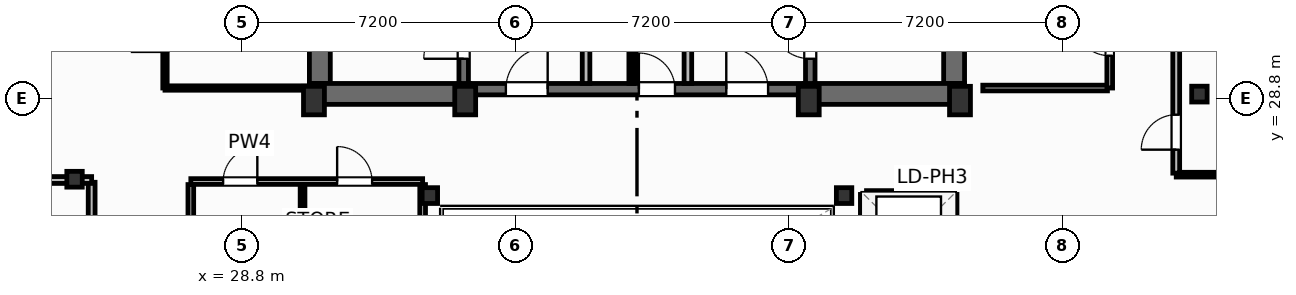
"""IFC4 building model, lengths in metres.
Left out: names, types, materials, properties, quantities, classifications, styles, units other than length and angle.
Written with IfcOpenShell. Run it as: python <this file> out.ifc"""

import sys

from ifc_helpers import new_model, si_unit, direction, frame, frame_2d, origin, origin_2d, place, context, subcontext, project, spatial, rectangle, i_section, extrude, element, fill, save


model = new_model("IFC4")
c1 = context("Model", 3, precision=1e-05, world=origin(), true_north=direction((0.0, 1.0)))
c2 = subcontext(c1, "Body", "Model", "MODEL_VIEW")
j1 = project(units=[si_unit("LENGTHUNIT", "METRE"), si_unit("PLANEANGLEUNIT", "RADIAN")], contexts=[c1])
p1 = place(None, origin())
s1 = spatial("IfcSite", under=j1, at=p1, CompositionType="ELEMENT")
p2 = place(p1, origin())
s2 = spatial("IfcBuilding", under=s1, at=p2, CompositionType="ELEMENT")
p3 = place(p2, frame((0.0, 0.0, 269.3)))
s3 = spatial("IfcBuildingStorey", under=s2, at=p3, CompositionType="ELEMENT", Elevation=269.3)
for number, where, z_axis, x_axis in (
    (1, (30.7, 28.75, 0.0), (0.0, 0.0, 1.0), (1.0, 0.0, 0.0)),
    (2, (34.68, 28.75, 0.0), (0.0, 0.0, 1.0), (1.0, 0.0, 0.0)),
    (3, (43.72, 28.75, 0.0), (0.0, 0.0, 1.0), (1.0, 0.0, 0.0)),
    (4, (47.7, 28.75, 0.0), (0.0, 0.0, 1.0), (1.0, 0.0, 0.0)),
):
    element("IfcColumn", number, at=place(p3, frame(where, z_axis=z_axis, x_axis=x_axis)), inside=s3, PredefinedType="COLUMN", context=c2, shape_type="SweptSolid", body=[
        extrude(rectangle(XDim=0.55, YDim=0.75, at=origin_2d()), origin(), (0.0, 0.0, 1.0), 3.7),
    ])
for number, where, z_axis, x_axis in (
    (5, (33.75, 26.25, 0.0), (0.0, 0.0, 1.0), (1.0, 0.0, 0.0)),
    (6, (44.65, 26.25, 0.0), (0.0, 0.0, 1.0), (1.0, 0.0, 0.0)),
    (7, (24.4, 26.68, 0.0), (0.0, 0.0, 1.0), (1.0, 0.0, 0.0)),
    (8, (54.0, 28.92, 0.0), (0.0, 0.0, 1.0), (1.0, 0.0, 0.0)),
):
    element("IfcColumn", number, at=place(p3, frame(where, z_axis=z_axis, x_axis=x_axis)), inside=s3, PredefinedType="COLUMN", context=c2, shape_type="SweptSolid", body=[
        extrude(i_section(OverallWidth=0.406, OverallDepth=0.416, WebThickness=0.03, FlangeThickness=0.048, FilletRadius=0.025, at=origin_2d()), origin(), (0.0, 0.0, 1.0), 3.7),
    ])
for number, where, z_axis, x_axis in (
    (9, (30.855, 29.2, 0.0), (0.0, 0.0, 1.0), (0.0, 1.0, 0.0)),
    (10, (47.545, 29.2, 0.0), (0.0, 0.0, 1.0), (0.0, 1.0, 0.0)),
):
    element("IfcWall", number, at=place(p3, frame(where, z_axis=z_axis, x_axis=x_axis)), inside=s3, PredefinedType="SHEAR", context=c2, shape_type="SweptSolid", body=[
        extrude(rectangle(XDim=9.22, YDim=0.55, at=frame_2d((4.61, 0.0))), origin(), (0.0, 0.0, 1.0), 3.45),
    ])
for number, where, z_axis, x_axis in (
    (11, (30.58, 28.925, 0.0), (0.0, 0.0, 1.0), (1.0, 0.0, 0.0)),
    (12, (43.6, 28.925, 0.0), (0.0, 0.0, 1.0), (1.0, 0.0, 0.0)),
):
    element("IfcWall", number, at=place(p3, frame(where, z_axis=z_axis, x_axis=x_axis)), inside=s3, PredefinedType="SHEAR", context=c2, shape_type="SweptSolid", body=[
        extrude(rectangle(XDim=4.22, YDim=0.55, at=frame_2d((2.11, 0.0))), origin(), (0.0, 0.0, 1.0), 3.45),
    ])
p4 = place(p3, frame((34.8, 29.05, 0.0), z_axis=(0.0, 0.0, 1.0), x_axis=(1.0, 0.0, 0.0)))
e13 = element("IfcWall", 13, at=p4, inside=s3, PredefinedType="SHEAR", context=c2, shape_type="SweptSolid", body=[
    extrude(rectangle(XDim=8.8, YDim=0.3, at=frame_2d((4.4, 0.0))), origin(), (0.0, 0.0, 1.0), 3.45),
])
p5 = place(p4, frame((0.95, 0.0, 0.0)))
e14 = element("IfcOpeningElement", 14, at=p5, cuts=e13, PredefinedType="OPENING", context=c2, shape_type="SweptSolid", body=[
    extrude(rectangle(XDim=1.1, YDim=2.15, at=frame_2d((0.55, 1.075))), frame((0.0, 0.16, 0.0), z_axis=(0.0, -1.0, 0.0), x_axis=(1.0, 0.0, 0.0)), (0.0, 0.0, 1.0), 0.32),
])
p6 = place(p4, frame((6.75, 0.0, 0.0)))
e15 = element("IfcOpeningElement", 15, at=p6, cuts=e13, PredefinedType="OPENING", context=c2, shape_type="SweptSolid", body=[
    extrude(rectangle(XDim=1.1, YDim=2.15, at=frame_2d((0.55, 1.075))), frame((0.0, 0.16, 0.0), z_axis=(0.0, -1.0, 0.0), x_axis=(1.0, 0.0, 0.0)), (0.0, 0.0, 1.0), 0.32),
])
p7 = place(p4, frame((4.45, 0.0, 0.0)))
e16 = element("IfcOpeningElement", 16, at=p7, cuts=e13, PredefinedType="OPENING", context=c2, shape_type="SweptSolid", body=[
    extrude(rectangle(XDim=0.95, YDim=2.15, at=frame_2d((0.475, 1.075))), frame((0.0, 0.16, 0.0), z_axis=(0.0, -1.0, 0.0), x_axis=(1.0, 0.0, 0.0)), (0.0, 0.0, 1.0), 0.32),
])
p8 = place(p3, frame((34.64, 29.2, 0.0), z_axis=(0.0, 0.0, 1.0), x_axis=(0.0, 1.0, 0.0)))
e17 = element("IfcWall", 17, at=p8, inside=s3, PredefinedType="SHEAR", context=c2, shape_type="SweptSolid", body=[
    extrude(rectangle(XDim=9.22, YDim=0.25, at=frame_2d((4.61, 0.0))), origin(), (0.0, 0.0, 1.0), 3.45),
])
p9 = place(p8, frame((0.65, 0.0, 0.0)))
e18 = element("IfcOpeningElement", 18, at=p9, cuts=e17, PredefinedType="OPENING", context=c2, shape_type="SweptSolid", body=[
    extrude(rectangle(XDim=1.05, YDim=2.15, at=frame_2d((0.525, 1.075))), frame((0.0, 0.135, 0.0), z_axis=(0.0, -1.0, 0.0), x_axis=(1.0, 0.0, 0.0)), (0.0, 0.0, 1.0), 0.27),
])
p10 = place(p3, frame((43.76, 29.2, 0.0), z_axis=(0.0, 0.0, 1.0), x_axis=(0.0, 1.0, 0.0)))
e19 = element("IfcWall", 19, at=p10, inside=s3, PredefinedType="SHEAR", context=c2, shape_type="SweptSolid", body=[
    extrude(rectangle(XDim=9.22, YDim=0.25, at=frame_2d((4.61, 0.0))), origin(), (0.0, 0.0, 1.0), 3.45),
])
p11 = place(p10, frame((0.65, 0.0, 0.0)))
e20 = element("IfcOpeningElement", 20, at=p11, cuts=e19, PredefinedType="OPENING", context=c2, shape_type="SweptSolid", body=[
    extrude(rectangle(XDim=1.05, YDim=2.15, at=frame_2d((0.525, 1.075))), frame((0.0, 0.135, 0.0), z_axis=(0.0, -1.0, 0.0), x_axis=(1.0, 0.0, 0.0)), (0.0, 0.0, 1.0), 0.27),
])
p12 = place(p3, frame((24.85, 23.03, 0.0), z_axis=(0.0, 0.0, 1.0), x_axis=(0.0, 1.0, 0.0)))
e21 = element("IfcWall", 21, at=p12, inside=s3, PredefinedType="PARTITIONING", context=c2, shape_type="SweptSolid", body=[
    extrude(rectangle(XDim=3.57, YDim=0.18, at=frame_2d((1.785, 0.0))), origin(), (0.0, 0.0, 1.0), 3.45),
])
p13 = place(p12, frame((1.5, 0.0, 0.0)))
e22 = element("IfcOpeningElement", 22, at=p13, cuts=e21, PredefinedType="OPENING", context=c2, shape_type="SweptSolid", body=[
    extrude(rectangle(XDim=0.92, YDim=2.05, at=frame_2d((0.46, 1.025))), frame((0.0, 0.1, 0.0), z_axis=(0.0, -1.0, 0.0), x_axis=(1.0, 0.0, 0.0)), (0.0, 0.0, 1.0), 0.2),
])
p14 = place(p3, frame((5.107, 26.66, 0.0), z_axis=(0.0, 0.0, 1.0), x_axis=(1.0, 0.0, 0.0)))
e23 = element("IfcWall", 23, at=p14, inside=s3, PredefinedType="PARTITIONING", context=c2, shape_type="SweptSolid", body=[
    extrude(rectangle(XDim=19.743, YDim=0.18, at=frame_2d((9.872, 0.0))), origin(), (0.0, 0.0, 1.0), 2.662),
])
p15 = place(p3, frame((53.39, 26.8, 0.0), z_axis=(0.0, 0.0, 1.0), x_axis=(1.0, 0.0, 0.0)))
e24 = element("IfcWall", 24, at=p15, inside=s3, PredefinedType="PARTITIONING", context=c2, shape_type="SweptSolid", body=[
    extrude(rectangle(XDim=22.348, YDim=0.125, at=frame_2d((11.174, 0.0))), origin(), (0.0, 0.0, 1.0), 3.45),
])
p16 = place(p3, frame((53.39, 26.84, 0.0), z_axis=(0.0, 0.0, 1.0), x_axis=(0.0, 1.0, 0.0)))
e25 = element("IfcWall", 25, at=p16, inside=s3, PredefinedType="PARTITIONING", context=c2, shape_type="SweptSolid", body=[
    extrude(rectangle(XDim=12.46, YDim=0.18, at=frame_2d((6.23, 0.0))), origin(), (0.0, 0.0, 1.0), 3.45),
])
p17 = place(p16, frame((0.618, 0.0, 0.0)))
e26 = element("IfcOpeningElement", 26, at=p17, cuts=e25, PredefinedType="OPENING", context=c2, shape_type="SweptSolid", body=[
    extrude(rectangle(XDim=0.92, YDim=2.05, at=frame_2d((0.46, 1.025))), frame((0.0, 0.1, 0.0), z_axis=(0.0, -1.0, 0.0), x_axis=(1.0, 0.0, 0.0)), (0.0, 0.0, 1.0), 0.2),
])
for number, where, z_axis, x_axis in (
    (27, (37.86, 29.2, 0.0), (0.0, 0.0, 1.0), (0.0, 1.0, 0.0)),
    (28, (40.54, 29.2, 0.0), (0.0, 0.0, 1.0), (0.0, 1.0, 0.0)),
):
    element("IfcWall", number, at=place(p3, frame(where, z_axis=z_axis, x_axis=x_axis)), inside=s3, PredefinedType="PARTITIONING", context=c2, shape_type="SweptSolid", body=[
        extrude(rectangle(XDim=5.18, YDim=0.2, at=frame_2d((2.59, 0.0))), origin(), (0.0, 0.0, 1.0), 3.45),
    ])
p18 = place(p3, frame((39.05, 29.2, 0.0), z_axis=(0.0, 0.0, 1.0), x_axis=(0.0, 1.0, 0.0)))
e29 = element("IfcWall", 29, at=p18, inside=s3, PredefinedType="PARTITIONING", context=c2, shape_type="SweptSolid", body=[
    extrude(rectangle(XDim=5.22, YDim=0.125, at=frame_2d((2.61, 0.0))), origin(), (0.0, 0.0, 1.0), 3.45),
])
p19 = place(p18, frame((2.05, 0.0, 0.0)))
e30 = element("IfcOpeningElement", 30, at=p19, cuts=e29, PredefinedType="OPENING", context=c2, shape_type="SweptSolid", body=[
    extrude(rectangle(XDim=0.85, YDim=2.05, at=frame_2d((0.425, 1.025))), frame((0.0, 0.073, 0.0), z_axis=(0.0, -1.0, 0.0), x_axis=(1.0, 0.0, 0.0)), (0.0, 0.0, 1.0), 0.145),
])
p20 = place(p3, frame((27.46, 26.62, 0.0), z_axis=(0.0, 0.0, 1.0), x_axis=(1.0, 0.0, 0.0)))
e31 = element("IfcWall", 31, at=p20, inside=s3, PredefinedType="PARTITIONING", context=c2, shape_type="SweptSolid", body=[
    extrude(rectangle(XDim=6.1, YDim=0.15, at=frame_2d((3.05, 0.0))), origin(), (0.0, 0.0, 1.0), 2.662),
])
p21 = place(p20, frame((0.85, 0.0, 0.0)))
e32 = element("IfcOpeningElement", 32, at=p21, cuts=e31, PredefinedType="OPENING", context=c2, shape_type="SweptSolid", body=[
    extrude(rectangle(XDim=0.9, YDim=2.05, at=frame_2d((0.45, 1.025))), frame((0.0, 0.085, 0.0), z_axis=(0.0, -1.0, 0.0), x_axis=(1.0, 0.0, 0.0)), (0.0, 0.0, 1.0), 0.17),
])
p22 = place(p20, frame((3.85, 0.0, 0.0)))
e33 = element("IfcOpeningElement", 33, at=p22, cuts=e31, PredefinedType="OPENING", context=c2, shape_type="SweptSolid", body=[
    extrude(rectangle(XDim=0.92, YDim=2.05, at=frame_2d((0.46, 1.025))), frame((0.0, 0.085, 0.0), z_axis=(0.0, -1.0, 0.0), x_axis=(1.0, 0.0, 0.0)), (0.0, 0.0, 1.0), 0.17),
])
p23 = place(p3, frame((30.4, 23.0, 0.0), z_axis=(0.0, 0.0, 1.0), x_axis=(0.0, 1.0, 0.0)))
e34 = element("IfcWall", 34, at=p23, inside=s3, PredefinedType="PARTITIONING", context=c2, shape_type="SweptSolid", body=[
    extrude(rectangle(XDim=3.54, YDim=0.125, at=frame_2d((1.77, 0.0))), origin(), (0.0, 0.0, 1.0), 3.45),
])
p24 = place(p3, frame((27.46, 19.38, 0.0), z_axis=(0.0, 0.0, 1.0), x_axis=(0.0, 1.0, 0.0)))
e35 = element("IfcWall", 35, at=p24, inside=s3, PredefinedType="PARTITIONING", context=c2, shape_type="SweptSolid", body=[
    extrude(rectangle(XDim=7.16, YDim=0.15, at=frame_2d((3.58, 0.0))), origin(), (0.0, 0.0, 1.0), 3.45),
])
p25 = place(p24, frame((1.1, 0.0, 0.0)))
e36 = element("IfcOpeningElement", 36, at=p25, cuts=e35, PredefinedType="OPENING", context=c2, shape_type="SweptSolid", body=[
    extrude(rectangle(XDim=0.95, YDim=2.05, at=frame_2d((0.475, 1.025))), frame((0.0, 0.085, 0.0), z_axis=(0.0, -1.0, 0.0), x_axis=(1.0, 0.0, 0.0)), (0.0, 0.0, 1.0), 0.17),
])
p26 = place(p3, frame((33.56, 19.38, 0.0), z_axis=(0.0, 0.0, 1.0), x_axis=(0.0, 1.0, 0.0)))
e37 = element("IfcWall", 37, at=p26, inside=s3, PredefinedType="PARTITIONING", context=c2, shape_type="SweptSolid", body=[
    extrude(rectangle(XDim=7.16, YDim=0.15, at=frame_2d((3.58, 0.0))), origin(), (0.0, 0.0, 1.0), 2.824),
])
p27 = place(p3, frame((26.78, 29.08, 0.0), z_axis=(0.0, 0.0, 1.0), x_axis=(1.0, 0.0, 0.0)))
e38 = element("IfcWall", 38, at=p27, inside=s3, PredefinedType="PARTITIONING", context=c2, shape_type="SweptSolid", body=[
    extrude(rectangle(XDim=3.8, YDim=0.115, at=frame_2d((1.9, 0.0))), origin(), (0.0, 0.0, 1.0), 3.45),
])
p28 = place(p3, frame((26.78, 29.08, 0.0), z_axis=(0.0, 0.0, 1.0), x_axis=(0.0, 1.0, 0.0)))
e39 = element("IfcWall", 39, at=p28, inside=s3, PredefinedType="PARTITIONING", context=c2, shape_type="SweptSolid", body=[
    extrude(rectangle(XDim=3.11, YDim=0.115, at=frame_2d((1.555, 0.0))), origin(), (0.0, 0.0, 1.0), 3.45),
])
p29 = place(p28, frame((0.95, 0.0, 0.0)))
e40 = element("IfcOpeningElement", 40, at=p29, cuts=e39, PredefinedType="OPENING", context=c2, shape_type="SweptSolid", body=[
    extrude(rectangle(XDim=0.9, YDim=2.05, at=frame_2d((0.45, 1.025))), frame((0.0, 0.067, 0.0), z_axis=(0.0, -1.0, 0.0), x_axis=(1.0, 0.0, 0.0)), (0.0, 0.0, 1.0), 0.135),
])
p30 = place(p3, frame((48.3, 29.08, 0.0), z_axis=(0.0, 0.0, 1.0), x_axis=(1.0, 0.0, 0.0)))
e41 = element("IfcWall", 41, at=p30, inside=s3, PredefinedType="PARTITIONING", context=c2, shape_type="SweptSolid", body=[
    extrude(rectangle(XDim=3.28, YDim=0.15, at=frame_2d((1.64, 0.0))), origin(), (0.0, 0.0, 1.0), 2.662),
])
p31 = place(p3, frame((51.64, 29.08, 0.0), z_axis=(0.0, 0.0, 1.0), x_axis=(0.0, 1.0, 0.0)))
e42 = element("IfcWall", 42, at=p31, inside=s3, PredefinedType="PARTITIONING", context=c2, shape_type="SweptSolid", body=[
    extrude(rectangle(XDim=6.88, YDim=0.15, at=frame_2d((3.44, 0.0))), origin(), (0.0, 0.0, 1.0), 3.45),
])
p32 = place(p31, frame((0.85, 0.0, 0.0)))
e43 = element("IfcOpeningElement", 43, at=p32, cuts=e42, PredefinedType="OPENING", context=c2, shape_type="SweptSolid", body=[
    extrude(rectangle(XDim=0.95, YDim=2.05, at=frame_2d((0.475, 1.025))), frame((0.0, 0.085, 0.0), z_axis=(0.0, -1.0, 0.0), x_axis=(1.0, 0.0, 0.0)), (0.0, 0.0, 1.0), 0.17),
])
p33 = place(p3, frame((45.24, 26.28, 0.0), z_axis=(0.0, 0.0, 1.0), x_axis=(1.0, 0.0, 0.0)))
e44 = element("IfcWall", 44, at=p33, inside=s3, PredefinedType="PARTITIONING", context=c2, shape_type="SweptSolid", body=[
    extrude(rectangle(XDim=2.22, YDim=0.2, at=frame_2d((1.11, 0.0))), origin(), (0.0, 0.0, 1.0), 3.45),
])
p34 = place(p3, frame((45.18, 19.38, 0.0), z_axis=(0.0, 0.0, 1.0), x_axis=(0.0, 1.0, 0.0)))
e45 = element("IfcWall", 45, at=p34, inside=s3, PredefinedType="PARTITIONING", context=c2, shape_type="SweptSolid", body=[
    extrude(rectangle(XDim=6.9, YDim=0.2, at=frame_2d((3.45, 0.0))), origin(), (0.0, 0.0, 1.0), 3.45),
])
p35 = place(p3, frame((47.52, 19.38, 0.0), z_axis=(0.0, 0.0, 1.0), x_axis=(0.0, 1.0, 0.0)))
e46 = element("IfcWall", 46, at=p35, inside=s3, PredefinedType="PARTITIONING", context=c2, shape_type="SweptSolid", body=[
    extrude(rectangle(XDim=6.9, YDim=0.2, at=frame_2d((3.45, 0.0))), origin(), (0.0, 0.0, 1.0), 3.45),
])
p36 = place(p35, frame((0.59, 0.0, 0.0)))
e47 = element("IfcOpeningElement", 47, at=p36, cuts=e46, PredefinedType="OPENING", context=c2, shape_type="SweptSolid", body=[
    extrude(rectangle(XDim=1.1, YDim=2.15, at=frame_2d((0.55, 1.075))), frame((0.0, 0.11, 0.0), z_axis=(0.0, -1.0, 0.0), x_axis=(1.0, 0.0, 0.0)), (0.0, 0.0, 1.0), 0.22),
])
p37 = place(p35, frame((2.89, 0.0, 0.0)))
e48 = element("IfcOpeningElement", 48, at=p37, cuts=e46, PredefinedType="OPENING", context=c2, shape_type="SweptSolid", body=[
    extrude(rectangle(XDim=1.1, YDim=2.15, at=frame_2d((0.55, 1.075))), frame((0.0, 0.11, 0.0), z_axis=(0.0, -1.0, 0.0), x_axis=(1.0, 0.0, 0.0)), (0.0, 0.0, 1.0), 0.22),
])
p38 = place(p35, frame((5.19, 0.0, 0.0)))
e49 = element("IfcOpeningElement", 49, at=p38, cuts=e46, PredefinedType="OPENING", context=c2, shape_type="SweptSolid", body=[
    extrude(rectangle(XDim=1.1, YDim=2.15, at=frame_2d((0.55, 1.075))), frame((0.0, 0.11, 0.0), z_axis=(0.0, -1.0, 0.0), x_axis=(1.0, 0.0, 0.0)), (0.0, 0.0, 1.0), 0.22),
])
p39 = place(p17, origin())
e50 = element("IfcDoor", 50, at=p39, inside=s3, OperationType="SINGLE_SWING_LEFT", PredefinedType="DOOR", context=c2, shape_type="SweptSolid", body=[
    extrude(rectangle(XDim=0.92, YDim=2.05, at=frame_2d((0.46, 1.025))), frame((0.0, 0.025, 0.0), z_axis=(0.0, -1.0, 0.0), x_axis=(1.0, 0.0, 0.0)), (0.0, 0.0, 1.0), 0.05),
])
fill(e26, e50)
p40 = place(p9, origin())
e51 = element("IfcDoor", 51, at=p40, inside=s3, OperationType="SINGLE_SWING_LEFT", PredefinedType="DOOR", context=c2, shape_type="SweptSolid", body=[
    extrude(rectangle(XDim=1.05, YDim=2.15, at=frame_2d((0.525, 1.075))), frame((0.0, 0.025, 0.0), z_axis=(0.0, -1.0, 0.0), x_axis=(1.0, 0.0, 0.0)), (0.0, 0.0, 1.0), 0.05),
])
fill(e18, e51)
p41 = place(p11, origin())
e52 = element("IfcDoor", 52, at=p41, inside=s3, OperationType="SINGLE_SWING_RIGHT", PredefinedType="DOOR", context=c2, shape_type="SweptSolid", body=[
    extrude(rectangle(XDim=1.05, YDim=2.15, at=frame_2d((0.525, 1.075))), frame((0.0, 0.025, 0.0), z_axis=(0.0, -1.0, 0.0), x_axis=(1.0, 0.0, 0.0)), (0.0, 0.0, 1.0), 0.05),
])
fill(e20, e52)
p42 = place(p5, origin())
e53 = element("IfcDoor", 53, at=p42, inside=s3, OperationType="SINGLE_SWING_RIGHT", PredefinedType="DOOR", context=c2, shape_type="SweptSolid", body=[
    extrude(rectangle(XDim=1.1, YDim=2.15, at=frame_2d((0.55, 1.075))), frame((0.0, 0.025, 0.0), z_axis=(0.0, -1.0, 0.0), x_axis=(1.0, 0.0, 0.0)), (0.0, 0.0, 1.0), 0.05),
])
fill(e14, e53)
p43 = place(p6, origin())
e54 = element("IfcDoor", 54, at=p43, inside=s3, OperationType="SINGLE_SWING_LEFT", PredefinedType="DOOR", context=c2, shape_type="SweptSolid", body=[
    extrude(rectangle(XDim=1.1, YDim=2.15, at=frame_2d((0.55, 1.075))), frame((0.0, 0.025, 0.0), z_axis=(0.0, -1.0, 0.0), x_axis=(1.0, 0.0, 0.0)), (0.0, 0.0, 1.0), 0.05),
])
fill(e15, e54)
p44 = place(p7, origin())
e55 = element("IfcDoor", 55, at=p44, inside=s3, OperationType="SINGLE_SWING_LEFT", PredefinedType="DOOR", context=c2, shape_type="SweptSolid", body=[
    extrude(rectangle(XDim=0.95, YDim=2.15, at=frame_2d((0.475, 1.075))), frame((0.0, 0.025, 0.0), z_axis=(0.0, -1.0, 0.0), x_axis=(1.0, 0.0, 0.0)), (0.0, 0.0, 1.0), 0.05),
])
fill(e16, e55)
p45 = place(p21, origin())
e56 = element("IfcDoor", 56, at=p45, inside=s3, OperationType="SINGLE_SWING_RIGHT", PredefinedType="DOOR", context=c2, shape_type="SweptSolid", body=[
    extrude(rectangle(XDim=0.9, YDim=2.05, at=frame_2d((0.45, 1.025))), frame((0.0, 0.025, 0.0), z_axis=(0.0, -1.0, 0.0), x_axis=(1.0, 0.0, 0.0)), (0.0, 0.0, 1.0), 0.05),
])
fill(e32, e56)
p46 = place(p22, origin())
e57 = element("IfcDoor", 57, at=p46, inside=s3, OperationType="SINGLE_SWING_LEFT", PredefinedType="DOOR", context=c2, shape_type="SweptSolid", body=[
    extrude(rectangle(XDim=0.92, YDim=2.05, at=frame_2d((0.46, 1.025))), frame((0.0, 0.025, 0.0), z_axis=(0.0, -1.0, 0.0), x_axis=(1.0, 0.0, 0.0)), (0.0, 0.0, 1.0), 0.05),
])
fill(e33, e57)
p47 = place(p32, origin())
e58 = element("IfcDoor", 58, at=p47, inside=s3, OperationType="SINGLE_SWING_RIGHT", PredefinedType="DOOR", context=c2, shape_type="SweptSolid", body=[
    extrude(rectangle(XDim=0.95, YDim=2.05, at=frame_2d((0.475, 1.025))), frame((0.0, 0.025, 0.0), z_axis=(0.0, -1.0, 0.0), x_axis=(1.0, 0.0, 0.0)), (0.0, 0.0, 1.0), 0.05),
])
fill(e43, e58)
save(model, sys.argv[1])
